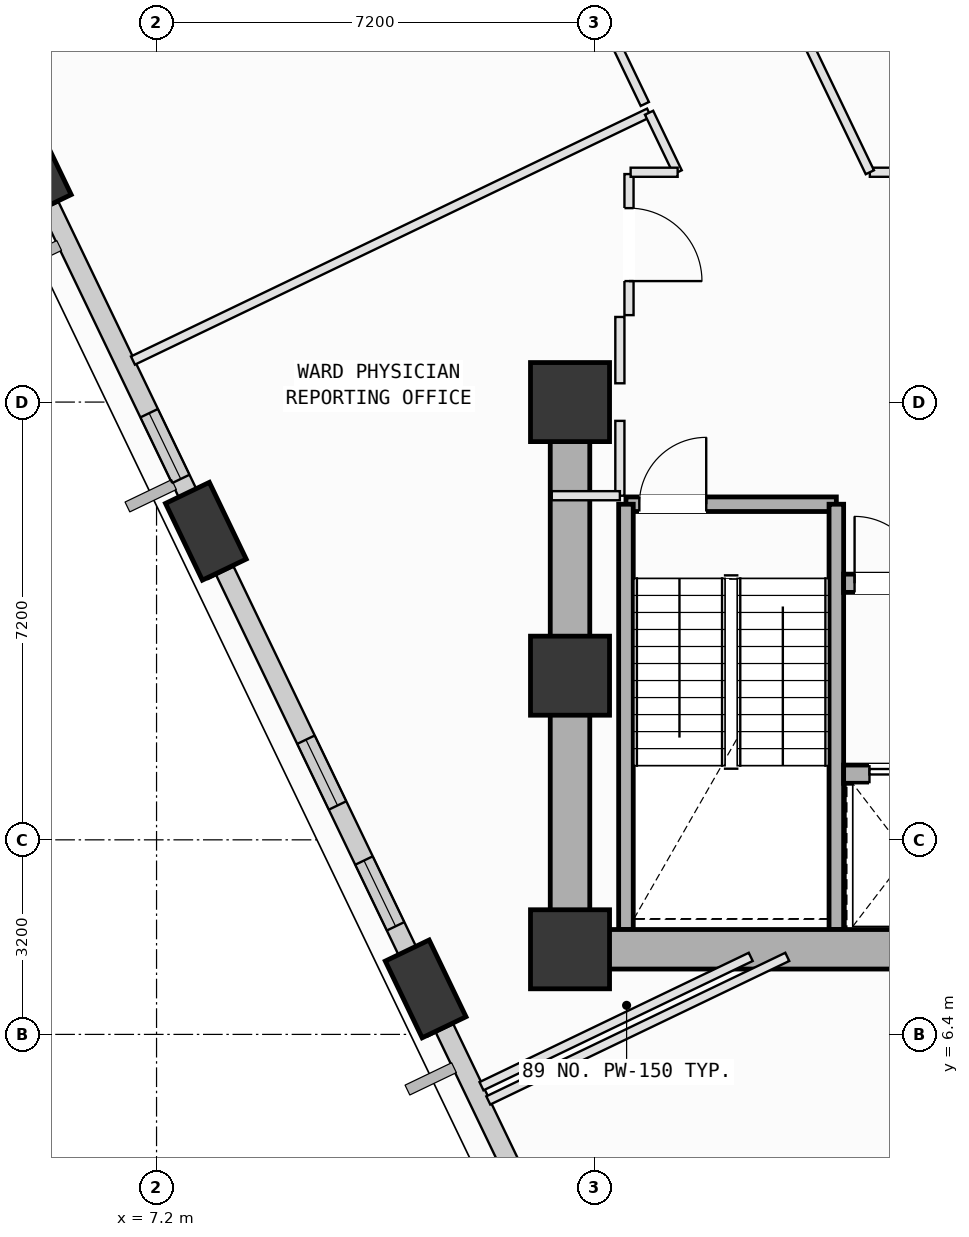
"""IFC4 building model, lengths in metres.
Left out: names, types, materials, properties, quantities, classifications, styles, units other than length and angle.
Written with IfcOpenShell. Run it as: python <this file> out.ifc"""

import sys

from ifc_helpers import new_model, si_unit, direction, frame, frame_2d, origin, origin_2d, place, context, subcontext, project, spatial, rectangle, extrude, element, fill, save


model = new_model("IFC4")
c1 = context("Model", 3, precision=1e-05, world=origin(), true_north=direction((0.0, 1.0)))
c2 = subcontext(c1, "Body", "Model", "MODEL_VIEW")
j1 = project(units=[si_unit("LENGTHUNIT", "METRE"), si_unit("PLANEANGLEUNIT", "RADIAN")], contexts=[c1])
p1 = place(None, origin())
s1 = spatial("IfcSite", under=j1, at=p1, CompositionType="ELEMENT")
p2 = place(p1, origin())
s2 = spatial("IfcBuilding", under=s1, at=p2, CompositionType="ELEMENT")
p3 = place(p2, frame((0.0, 0.0, 132.4)))
s3 = spatial("IfcBuildingStorey", under=s2, at=p3, CompositionType="ELEMENT", Elevation=132.4)
for number, where, z_axis, x_axis in (
    (1, (14.0, 7.8, 0.0), (0.0, 0.0, 1.0), (1.0, 0.0, 0.0)),
    (2, (14.0, 12.3, 0.0), (0.0, 0.0, 1.0), (1.0, 0.0, 0.0)),
    (3, (14.0, 16.8, 0.0), (0.0, 0.0, 1.0), (1.0, 0.0, 0.0)),
):
    element("IfcColumn", number, at=place(p3, frame(where, z_axis=z_axis, x_axis=x_axis)), inside=s3, PredefinedType="COLUMN", context=c2, shape_type="SweptSolid", body=[
        extrude(rectangle(XDim=1.3, YDim=1.3, at=origin_2d()), origin(), (0.0, 0.0, 1.0), 4.0),
    ])
p4 = place(p3, frame((5.132, 20.67, 0.002), z_axis=(0.017955796838, -0.117015986828, 0.992967697454), x_axis=(-0.563628738053, 0.819105386602, 0.106719310723)))
e4 = element("IfcColumn", 4, at=p4, inside=s3, PredefinedType="COLUMN", context=c2, shape_type="SweptSolid", body=[
    extrude(rectangle(XDim=1.4, YDim=0.8, at=origin_2d()), origin(), (0.0, 0.0, 1.0), 4.025),
])
p5 = place(p3, frame((8.011, 14.675, 0.002), z_axis=(0.042609410713, -0.105066794792, 0.993551914472), x_axis=(-0.737738002522, 0.667305569433, 0.102205267179)))
e5 = element("IfcColumn", 5, at=p5, inside=s3, PredefinedType="COLUMN", context=c2, shape_type="SweptSolid", body=[
    extrude(rectangle(XDim=1.4, YDim=0.8, at=origin_2d()), origin(), (0.0, 0.0, 1.0), 4.022),
])
p6 = place(p3, frame((11.625, 7.148, 0.002), z_axis=(0.073420813254, -0.089864648289, 0.993244043108), x_axis=(-0.901710787892, 0.419493356456, 0.104608694133)))
e6 = element("IfcColumn", 6, at=p6, inside=s3, PredefinedType="COLUMN", context=c2, shape_type="SweptSolid", body=[
    extrude(rectangle(XDim=1.4, YDim=0.8, at=origin_2d()), origin(), (0.0, 0.0, 1.0), 4.023),
])
p7 = place(p3, frame((7.895, 14.917, 0.0), z_axis=(0.0, 0.0, 1.0), x_axis=(-0.432875447472, 0.901453740896, 0.0)))
e7 = element("IfcWall", 7, at=p7, inside=s3, PredefinedType="SOLIDWALL", context=c2, shape_type="SweptSolid", body=[
    extrude(rectangle(XDim=5.662, YDim=0.32, at=frame_2d((2.831, 0.0))), origin(), (0.0, 0.0, 1.0), 3.165),
])
p8 = place(p7, frame((0.686, 0.0, 0.75)))
e8 = element("IfcOpeningElement", 8, at=p8, cuts=e7, PredefinedType="OPENING", context=c2, shape_type="SweptSolid", body=[
    extrude(rectangle(XDim=1.2, YDim=1.75, at=frame_2d((0.6, 0.875))), frame((0.0, 0.17, 0.0), z_axis=(0.0, -1.0, 0.0), x_axis=(1.0, 0.0, 0.0)), (0.0, 0.0, 1.0), 0.34),
])
p9 = place(p3, frame((11.51, 7.388, 0.0), z_axis=(0.0, 0.0, 1.0), x_axis=(-0.43286693409, 0.901457828948, 0.0)))
e9 = element("IfcWall", 9, at=p9, inside=s3, PredefinedType="SOLIDWALL", context=c2, shape_type="SweptSolid", body=[
    extrude(rectangle(XDim=7.36, YDim=0.32, at=frame_2d((3.68, 0.0))), origin(), (0.0, 0.0, 1.0), 3.165),
])
p10 = place(p9, frame((3.081, 0.0, 0.75)))
e10 = element("IfcOpeningElement", 10, at=p10, cuts=e9, PredefinedType="OPENING", context=c2, shape_type="SweptSolid", body=[
    extrude(rectangle(XDim=1.2, YDim=1.75, at=frame_2d((0.6, 0.875))), frame((0.0, 0.17, 0.0), z_axis=(0.0, -1.0, 0.0), x_axis=(1.0, 0.0, 0.0)), (0.0, 0.0, 1.0), 0.34),
])
p11 = place(p9, frame((0.876, 0.0, 0.75)))
e11 = element("IfcOpeningElement", 11, at=p11, cuts=e9, PredefinedType="OPENING", context=c2, shape_type="SweptSolid", body=[
    extrude(rectangle(XDim=1.2, YDim=1.75, at=frame_2d((0.6, 0.875))), frame((0.0, 0.17, 0.0), z_axis=(0.0, -1.0, 0.0), x_axis=(1.0, 0.0, 0.0)), (0.0, 0.0, 1.0), 0.34),
])
p12 = place(p3, frame((14.631, 0.889, 0.0), z_axis=(0.0, 0.0, 1.0), x_axis=(-0.432861148753, 0.90146060696, 0.0)))
e12 = element("IfcWall", 12, at=p12, inside=s3, PredefinedType="SOLIDWALL", context=c2, shape_type="SweptSolid", body=[
    extrude(rectangle(XDim=6.223, YDim=0.32, at=frame_2d((3.112, 0.0))), origin(), (0.0, 0.0, 1.0), 3.165),
])
p13 = place(p12, frame((1.52, 0.0, 0.75)))
e13 = element("IfcOpeningElement", 13, at=p13, cuts=e12, PredefinedType="OPENING", context=c2, shape_type="SweptSolid", body=[
    extrude(rectangle(XDim=1.6, YDim=1.95, at=frame_2d((0.8, 0.975))), frame((0.0, 0.17, 0.0), z_axis=(0.0, -1.0, 0.0), x_axis=(1.0, 0.0, 0.0)), (0.0, 0.0, 1.0), 0.34),
])
p14 = place(p3, frame((14.92, 15.12, 0.0), z_axis=(0.0, 0.0, 1.0), x_axis=(1.0, 0.0, 0.0)))
e14 = element("IfcWall", 14, at=p14, inside=s3, PredefinedType="SOLIDWALL", context=c2, shape_type="SweptSolid", body=[
    extrude(rectangle(XDim=3.46, YDim=0.24, at=frame_2d((1.73, 0.0))), origin(), (0.0, 0.0, 1.0), 3.78),
])
p15 = place(p14, frame((0.22, 0.0, 0.0)))
e15 = element("IfcOpeningElement", 15, at=p15, cuts=e14, PredefinedType="OPENING", context=c2, shape_type="SweptSolid", body=[
    extrude(rectangle(XDim=1.1, YDim=2.15, at=frame_2d((0.55, 1.075))), frame((0.0, 0.13, 0.0), z_axis=(0.0, -1.0, 0.0), x_axis=(1.0, 0.0, 0.0)), (0.0, 0.0, 1.0), 0.26),
])
for number, where, z_axis, x_axis in (
    (16, (18.38, 15.12, 0.0), (0.0, 0.0, 1.0), (0.0, -1.0, 0.0)),
    (17, (14.92, 8.125, 0.0), (0.0, 0.0, 1.0), (0.0, 1.0, 0.0)),
):
    element("IfcWall", number, at=place(p3, frame(where, z_axis=z_axis, x_axis=x_axis)), inside=s3, PredefinedType="SOLIDWALL", context=c2, shape_type="SweptSolid", body=[
        extrude(rectangle(XDim=6.995, YDim=0.24, at=frame_2d((3.498, 0.0))), origin(), (0.0, 0.0, 1.0), 3.78),
    ])
p16 = place(p3, frame((14.0, 7.8, 0.0), z_axis=(0.0, 0.0, 1.0), x_axis=(1.0, 0.0, 0.0)))
e18 = element("IfcWall", 18, at=p16, inside=s3, PredefinedType="SHEAR", context=c2, shape_type="SweptSolid", body=[
    extrude(rectangle(XDim=10.8, YDim=0.65, at=frame_2d((5.4, 0.0))), origin(), (0.0, 0.0, 1.0), 3.78),
])
p17 = place(p3, frame((14.0, 16.8, 0.0), z_axis=(0.0, 0.0, 1.0), x_axis=(0.0, -1.0, 0.0)))
e19 = element("IfcWall", 19, at=p17, inside=s3, PredefinedType="SHEAR", context=c2, shape_type="SweptSolid", body=[
    extrude(rectangle(XDim=9.0, YDim=0.65, at=frame_2d((4.5, 0.0))), origin(), (0.0, 0.0, 1.0), 3.78),
])
p18 = place(p3, frame((18.5, 10.68, 0.0), z_axis=(0.0, 0.0, 1.0), x_axis=(1.0, 0.0, 0.0)))
e20 = element("IfcWall", 20, at=p18, inside=s3, PredefinedType="SOLIDWALL", context=c2, shape_type="SweptSolid", body=[
    extrude(rectangle(XDim=5.3, YDim=0.3, at=frame_2d((2.65, 0.0))), origin(), (0.0, 0.0, 1.0), 3.78),
])
p19 = place(p18, frame((4.22, 0.0, 0.0)))
e21 = element("IfcOpeningElement", 21, at=p19, cuts=e20, PredefinedType="OPENING", context=c2, shape_type="SweptSolid", body=[
    extrude(rectangle(XDim=0.86, YDim=2.06, at=frame_2d((0.43, 1.03))), frame((0.0, 0.16, 0.0), z_axis=(0.0, -1.0, 0.0), x_axis=(1.0, 0.0, 0.0)), (0.0, 0.0, 1.0), 0.32),
])
p20 = place(p18, frame((0.425, 0.0, 0.0)))
e22 = element("IfcOpeningElement", 22, at=p20, cuts=e20, PredefinedType="OPENING", context=c2, shape_type="SweptSolid", body=[
    extrude(rectangle(XDim=1.25, YDim=2.18, at=frame_2d((0.625, 1.09))), frame((0.0, 0.16, 0.0), z_axis=(0.0, -1.0, 0.0), x_axis=(1.0, 0.0, 0.0)), (0.0, 0.0, 1.0), 0.32),
])
p21 = place(p18, frame((2.525, 0.0, 0.0)))
e23 = element("IfcOpeningElement", 23, at=p21, cuts=e20, PredefinedType="OPENING", context=c2, shape_type="SweptSolid", body=[
    extrude(rectangle(XDim=1.25, YDim=2.18, at=frame_2d((0.625, 1.09))), frame((0.0, 0.16, 0.0), z_axis=(0.0, -1.0, 0.0), x_axis=(1.0, 0.0, 0.0)), (0.0, 0.0, 1.0), 0.32),
])
p22 = place(p3, frame((18.5, 13.82, 0.0), z_axis=(0.0, 0.0, 1.0), x_axis=(1.0, 0.0, 0.0)))
e24 = element("IfcWall", 24, at=p22, inside=s3, PredefinedType="SOLIDWALL", context=c2, shape_type="SweptSolid", body=[
    extrude(rectangle(XDim=5.3, YDim=0.3, at=frame_2d((2.65, 0.0))), origin(), (0.0, 0.0, 1.0), 3.78),
])
p23 = place(p22, frame((0.18, 0.0, 0.0)))
e25 = element("IfcOpeningElement", 25, at=p23, cuts=e24, PredefinedType="OPENING", context=c2, shape_type="SweptSolid", body=[
    extrude(rectangle(XDim=1.1, YDim=2.15, at=frame_2d((0.55, 1.075))), frame((0.0, 0.16, 0.0), z_axis=(0.0, -1.0, 0.0), x_axis=(1.0, 0.0, 0.0)), (0.0, 0.0, 1.0), 0.32),
])
p24 = place(p3, frame((12.656, 5.314, 0.0), z_axis=(0.0, 0.0, 1.0), x_axis=(0.901456693358, 0.43286929898, 0.0)))
e26 = element("IfcWall", 26, at=p24, inside=s3, PredefinedType="PARTITIONING", context=c2, shape_type="SweptSolid", body=[
    extrude(rectangle(XDim=5.455, YDim=0.15, at=frame_2d((2.727, 0.0))), origin(), (0.0, 0.0, 1.0), 3.78),
])
p25 = place(p3, frame((14.97, 20.55, 0.0), z_axis=(0.0, 0.0, 1.0), x_axis=(0.0, -1.0, 0.0)))
e27 = element("IfcWall", 27, at=p25, inside=s3, PredefinedType="PARTITIONING", context=c2, shape_type="SweptSolid", body=[
    extrude(rectangle(XDim=2.32, YDim=0.15, at=frame_2d((1.16, 0.0))), origin(), (0.0, 0.0, 1.0), 2.965),
])
p26 = place(p25, frame((0.56, 0.0, 0.0)))
e28 = element("IfcOpeningElement", 28, at=p26, cuts=e27, PredefinedType="OPENING", context=c2, shape_type="SweptSolid", body=[
    extrude(rectangle(XDim=1.2, YDim=2.15, at=frame_2d((0.6, 1.075))), frame((0.0, 0.085, 0.0), z_axis=(0.0, -1.0, 0.0), x_axis=(1.0, 0.0, 0.0)), (0.0, 0.0, 1.0), 0.17),
])
p27 = place(p3, frame((14.82, 18.2, 0.0), z_axis=(0.0, 0.0, 1.0), x_axis=(0.0, -1.0, 0.0)))
e29 = element("IfcWall", 29, at=p27, inside=s3, PredefinedType="PARTITIONING", context=c2, shape_type="SweptSolid", body=[
    extrude(rectangle(XDim=1.091, YDim=0.15, at=frame_2d((0.545, 0.0))), origin(), (0.0, 0.0, 1.0), 3.78),
])
p28 = place(p3, frame((14.82, 16.491, 0.0), z_axis=(0.0, 0.0, 1.0), x_axis=(0.0, -1.0, 0.0)))
e30 = element("IfcWall", 30, at=p28, inside=s3, PredefinedType="PARTITIONING", context=c2, shape_type="SweptSolid", body=[
    extrude(rectangle(XDim=1.231, YDim=0.15, at=frame_2d((0.615, 0.0))), origin(), (0.0, 0.0, 1.0), 3.78),
])
p29 = place(p3, frame((14.82, 15.26, 0.0), z_axis=(0.0, 0.0, 1.0), x_axis=(-1.0, 0.0, 0.0)))
e31 = element("IfcWall", 31, at=p29, inside=s3, PredefinedType="PARTITIONING", context=c2, shape_type="SweptSolid", body=[
    extrude(rectangle(XDim=1.12, YDim=0.15, at=frame_2d((0.56, 0.0))), origin(), (0.0, 0.0, 1.0), 3.78),
])
p30 = place(p3, frame((16.972, 7.675, 0.0), z_axis=(0.0, 0.0, 1.0), x_axis=(-0.901402036938, -0.432983103369, 0.0)))
e32 = element("IfcWall", 32, at=p30, inside=s3, PredefinedType="PARTITIONING", context=c2, shape_type="SweptSolid", body=[
    extrude(rectangle(XDim=4.912, YDim=0.15, at=frame_2d((2.456, 0.0))), origin(), (0.0, 0.0, 1.0), 3.78),
])
p31 = place(p3, frame((11.73, 6.4, 0.0), z_axis=(0.0, 0.0, 1.0), x_axis=(-0.432900038222, 0.901441932078, 0.0)))
e33 = element("IfcWall", 33, at=p31, inside=s3, PredefinedType="PARTITIONING", context=c2, shape_type="SweptSolid", body=[
    extrude(rectangle(XDim=0.986, YDim=0.15, at=frame_2d((0.493, 0.0))), origin(), (0.0, 0.0, 1.0), 3.165),
])
p32 = place(p3, frame((8.117, 13.923, 0.0), z_axis=(0.0, 0.0, 1.0), x_axis=(-0.432994834591, 0.901396401822, 0.0)))
e34 = element("IfcWall", 34, at=p32, inside=s3, PredefinedType="PARTITIONING", context=c2, shape_type="SweptSolid", body=[
    extrude(rectangle(XDim=0.993, YDim=0.15, at=frame_2d((0.497, 0.0))), origin(), (0.0, 0.0, 1.0), 3.165),
])
p33 = place(p3, frame((6.812, 17.483, 0.0), z_axis=(0.0, 0.0, 1.0), x_axis=(0.90144374065, 0.432896272152, 0.0)))
e35 = element("IfcWall", 35, at=p33, inside=s3, PredefinedType="PARTITIONING", context=c2, shape_type="SweptSolid", body=[
    extrude(rectangle(XDim=9.416, YDim=0.15, at=frame_2d((4.708, 0.0))), origin(), (0.0, 0.0, 1.0), 3.78),
])
p34 = place(p3, frame((15.3, 21.559, 0.0), z_axis=(0.0, 0.0, 1.0), x_axis=(0.432767610523, -0.901505515947, 0.0)))
e36 = element("IfcWall", 36, at=p34, inside=s3, PredefinedType="PARTITIONING", context=c2, shape_type="SweptSolid", body=[
    extrude(rectangle(XDim=1.086, YDim=0.15, at=frame_2d((0.543, 0.0))), origin(), (0.0, 0.0, 1.0), 3.78),
])
p35 = place(p3, frame((15.77, 20.58, 0.0), z_axis=(0.0, 0.0, 1.0), x_axis=(-1.0, 0.0, 0.0)))
e37 = element("IfcWall", 37, at=p35, inside=s3, PredefinedType="PARTITIONING", context=c2, shape_type="SweptSolid", body=[
    extrude(rectangle(XDim=0.773, YDim=0.15, at=frame_2d((0.386, 0.0))), origin(), (0.0, 0.0, 1.0), 3.78),
])
p36 = place(p3, frame((9.499, 33.638, 0.0), z_axis=(0.0, 0.0, 1.0), x_axis=(0.432861750003, -0.901460318253, 0.0)))
e38 = element("IfcWall", 38, at=p36, inside=s3, PredefinedType="PARTITIONING", context=c2, shape_type="SweptSolid", body=[
    extrude(rectangle(XDim=13.24, YDim=0.15, at=frame_2d((6.62, 0.0))), origin(), (0.0, 0.0, 1.0), 2.965),
])
p37 = place(p36, frame((6.02, 0.0, 0.0)))
e39 = element("IfcOpeningElement", 39, at=p37, cuts=e38, PredefinedType="OPENING", context=c2, shape_type="SweptSolid", body=[
    extrude(rectangle(XDim=1.2, YDim=2.15, at=frame_2d((0.6, 1.075))), frame((0.0, 0.085, 0.0), z_axis=(0.0, -1.0, 0.0), x_axis=(1.0, 0.0, 0.0)), (0.0, 0.0, 1.0), 0.17),
])
p38 = place(p3, frame((19.591, 20.58, 0.0), z_axis=(0.0, 0.0, 1.0), x_axis=(-1.0, 0.0, 0.0)))
e40 = element("IfcWall", 40, at=p38, inside=s3, PredefinedType="PARTITIONING", context=c2, shape_type="SweptSolid", body=[
    extrude(rectangle(XDim=0.66, YDim=0.15, at=frame_2d((0.33, 0.0))), origin(), (0.0, 0.0, 1.0), 3.78),
])
p39 = place(p3, frame((18.931, 20.58, 0.0), z_axis=(0.0, 0.0, 1.0), x_axis=(-0.43286607563, 0.901458241168, 0.0)))
e41 = element("IfcWall", 41, at=p39, inside=s3, PredefinedType="PARTITIONING", context=c2, shape_type="SweptSolid", body=[
    extrude(rectangle(XDim=9.465, YDim=0.15, at=frame_2d((4.732, 0.0))), origin(), (0.0, 0.0, 1.0), 3.78),
])
p40 = place(p39, frame((4.132, 0.0, 0.0)))
e42 = element("IfcOpeningElement", 42, at=p40, cuts=e41, PredefinedType="OPENING", context=c2, shape_type="SweptSolid", body=[
    extrude(rectangle(XDim=1.2, YDim=2.15, at=frame_2d((0.6, 1.075))), frame((0.0, 0.085, 0.0), z_axis=(0.0, -1.0, 0.0), x_axis=(1.0, 0.0, 0.0)), (0.0, 0.0, 1.0), 0.17),
])
p41 = place(p8, origin())
e43 = element("IfcWindow", 43, at=p41, inside=s3, PartitioningType="SINGLE_PANEL", PredefinedType="WINDOW", context=c2, shape_type="SweptSolid", body=[
    extrude(rectangle(XDim=1.2, YDim=1.75, at=frame_2d((0.6, 0.875))), frame((0.0, 0.03, 0.0), z_axis=(0.0, -1.0, 0.0), x_axis=(1.0, 0.0, 0.0)), (0.0, 0.0, 1.0), 0.06),
])
fill(e8, e43)
p42 = place(p10, origin())
e44 = element("IfcWindow", 44, at=p42, inside=s3, PartitioningType="SINGLE_PANEL", PredefinedType="WINDOW", context=c2, shape_type="SweptSolid", body=[
    extrude(rectangle(XDim=1.2, YDim=1.75, at=frame_2d((0.6, 0.875))), frame((0.0, 0.03, 0.0), z_axis=(0.0, -1.0, 0.0), x_axis=(1.0, 0.0, 0.0)), (0.0, 0.0, 1.0), 0.06),
])
fill(e10, e44)
p43 = place(p11, origin())
e45 = element("IfcWindow", 45, at=p43, inside=s3, PartitioningType="SINGLE_PANEL", PredefinedType="WINDOW", context=c2, shape_type="SweptSolid", body=[
    extrude(rectangle(XDim=1.2, YDim=1.75, at=frame_2d((0.6, 0.875))), frame((0.0, 0.03, 0.0), z_axis=(0.0, -1.0, 0.0), x_axis=(1.0, 0.0, 0.0)), (0.0, 0.0, 1.0), 0.06),
])
fill(e11, e45)
p44 = place(p15, origin())
e46 = element("IfcDoor", 46, at=p44, inside=s3, OperationType="SINGLE_SWING_RIGHT", PredefinedType="DOOR", context=c2, shape_type="SweptSolid", body=[
    extrude(rectangle(XDim=1.1, YDim=2.15, at=frame_2d((0.55, 1.075))), frame((0.0, 0.025, 0.0), z_axis=(0.0, -1.0, 0.0), x_axis=(1.0, 0.0, 0.0)), (0.0, 0.0, 1.0), 0.05),
])
fill(e15, e46)
p45 = place(p23, origin())
e47 = element("IfcDoor", 47, at=p45, inside=s3, OperationType="SINGLE_SWING_LEFT", PredefinedType="DOOR", context=c2, shape_type="SweptSolid", body=[
    extrude(rectangle(XDim=1.1, YDim=2.15, at=frame_2d((0.55, 1.075))), frame((0.0, 0.025, 0.0), z_axis=(0.0, -1.0, 0.0), x_axis=(1.0, 0.0, 0.0)), (0.0, 0.0, 1.0), 0.05),
])
fill(e25, e47)
p46 = place(p20, origin())
e48 = element("IfcDoor", 48, at=p46, inside=s3, OperationType="DOUBLE_DOOR_SLIDING", PredefinedType="DOOR", context=c2, shape_type="SweptSolid", body=[
    extrude(rectangle(XDim=1.25, YDim=2.18, at=frame_2d((0.625, 1.09))), frame((0.0, 0.025, 0.0), z_axis=(0.0, -1.0, 0.0), x_axis=(1.0, 0.0, 0.0)), (0.0, 0.0, 1.0), 0.05),
])
fill(e22, e48)
p47 = place(p26, origin())
e49 = element("IfcDoor", 49, at=p47, inside=s3, OperationType="SINGLE_SWING_RIGHT", PredefinedType="DOOR", context=c2, shape_type="SweptSolid", body=[
    extrude(rectangle(XDim=1.2, YDim=2.15, at=frame_2d((0.6, 1.075))), frame((0.0, 0.025, 0.0), z_axis=(0.0, -1.0, 0.0), x_axis=(1.0, 0.0, 0.0)), (0.0, 0.0, 1.0), 0.05),
])
fill(e28, e49)
save(model, sys.argv[1])
